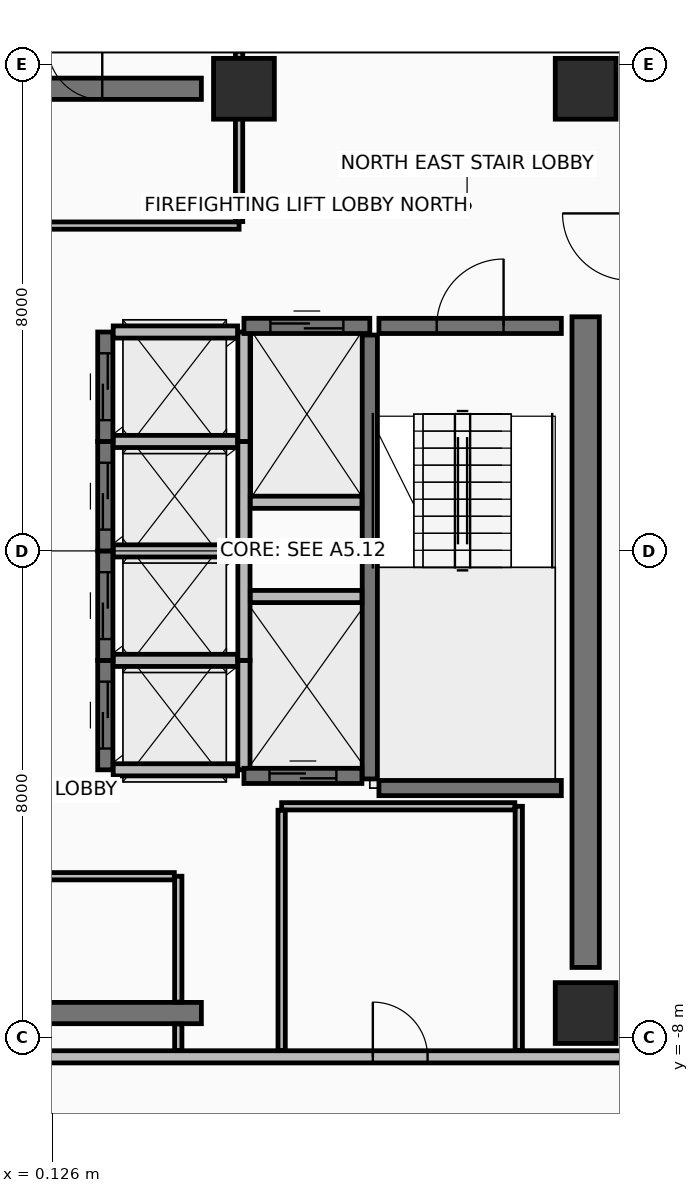
"""IFC4 building model, lengths in metres.
Left out: names, types, materials, properties, quantities, classifications, styles, units other than length and angle.
Written with IfcOpenShell. Run it as: python <this file> out.ifc"""

import sys

from ifc_helpers import new_model, si_unit, direction, frame, frame_2d, origin, origin_2d, place, context, subcontext, project, spatial, rectangle, extrude, element, fill, save


model = new_model("IFC4")
c1 = context("Model", 3, precision=1e-05, world=origin(), true_north=direction((0.0, 1.0)))
c2 = subcontext(c1, "Body", "Model", "MODEL_VIEW")
j1 = project(units=[si_unit("LENGTHUNIT", "METRE"), si_unit("PLANEANGLEUNIT", "RADIAN")], contexts=[c1])
p1 = place(None, origin())
s1 = spatial("IfcSite", under=j1, at=p1, CompositionType="ELEMENT")
p2 = place(p1, origin())
s2 = spatial("IfcBuilding", under=s1, at=p2, CompositionType="ELEMENT")
p3 = place(p2, frame((0.0, 0.0, 230.65)))
s3 = spatial("IfcBuildingStorey", under=s2, at=p3, CompositionType="ELEMENT", Elevation=230.65)
for number, where, z_axis, x_axis in (
    (1, (8.9, -7.6, 0.0), (0.0, 0.0, 1.0), (1.0, 0.0, 0.0)),
    (2, (8.9, 7.6, 0.0), (0.0, 0.0, 1.0), (1.0, 0.0, 0.0)),
    (3, (3.28, 7.6, 0.0), (0.0, 0.0, 1.0), (1.0, 0.0, 0.0)),
):
    element("IfcColumn", number, at=place(p3, frame(where, z_axis=z_axis, x_axis=x_axis)), inside=s3, PredefinedType="COLUMN", context=c2, shape_type="SweptSolid", body=[
        extrude(rectangle(XDim=1.0, YDim=1.0, at=origin_2d()), origin(), (0.0, 0.0, 1.0), 3.6),
    ])
for number, where, z_axis, x_axis in (
    (4, (-2.8, -7.6, 0.0), (0.0, 0.0, 1.0), (1.0, 0.0, 0.0)),
    (5, (-2.8, 7.6, 0.0), (0.0, 0.0, 1.0), (1.0, 0.0, 0.0)),
):
    element("IfcWall", number, at=place(p3, frame(where, z_axis=z_axis, x_axis=x_axis)), inside=s3, PredefinedType="SHEAR", context=c2, shape_type="SweptSolid", body=[
        extrude(rectangle(XDim=5.38, YDim=0.35, at=frame_2d((2.69, 0.0))), origin(), (0.0, 0.0, 1.0), 3.42),
    ])
p4 = place(p3, frame((8.9, -6.85, 0.0), z_axis=(0.0, 0.0, 1.0), x_axis=(0.0, 1.0, 0.0)))
e6 = element("IfcWall", 6, at=p4, inside=s3, PredefinedType="SHEAR", context=c2, shape_type="SweptSolid", body=[
    extrude(rectangle(XDim=10.7, YDim=0.45, at=frame_2d((5.35, 0.0))), origin(), (0.0, 0.0, 1.0), 3.42),
])
p5 = place(p3, frame((-9.62, -8.32, 0.0), z_axis=(0.0, 0.0, 1.0), x_axis=(1.0, 0.0, 0.0)))
e7 = element("IfcWall", 7, at=p5, inside=s3, PredefinedType="PARTITIONING", context=c2, shape_type="SweptSolid", body=[
    extrude(rectangle(XDim=19.24, YDim=0.2, at=frame_2d((9.62, 0.0))), origin(), (0.0, 0.0, 1.0), 2.915),
])
p6 = place(p5, frame((8.57, 0.0, 0.0)))
e8 = element("IfcOpeningElement", 8, at=p6, cuts=e7, PredefinedType="OPENING", context=c2, shape_type="SweptSolid", body=[
    extrude(rectangle(XDim=0.9, YDim=2.1, at=frame_2d((0.45, 1.05))), frame((0.0, 0.11, 0.0), z_axis=(0.0, -1.0, 0.0), x_axis=(1.0, 0.0, 0.0)), (0.0, 0.0, 1.0), 0.22),
])
p7 = place(p5, frame((15.02, 0.0, 0.0)))
e9 = element("IfcOpeningElement", 9, at=p7, cuts=e7, PredefinedType="OPENING", context=c2, shape_type="SweptSolid", body=[
    extrude(rectangle(XDim=0.9, YDim=2.1, at=frame_2d((0.45, 1.05))), frame((0.0, 0.11, 0.0), z_axis=(0.0, -1.0, 0.0), x_axis=(1.0, 0.0, 0.0)), (0.0, 0.0, 1.0), 0.22),
])
p8 = place(p3, frame((5.35, -3.75, 0.0), z_axis=(0.0, 0.0, 1.0), x_axis=(0.0, 1.0, 0.0)))
e10 = element("IfcWall", 10, at=p8, inside=s3, PredefinedType="SHEAR", context=c2, shape_type="SweptSolid", body=[
    extrude(rectangle(XDim=7.3, YDim=0.25, at=frame_2d((3.65, 0.0))), origin(), (0.0, 0.0, 1.0), 3.42),
])
p9 = place(p3, frame((5.5, 3.7, 0.0), z_axis=(0.0, 0.0, 1.0), x_axis=(1.0, 0.0, 0.0)))
e11 = element("IfcWall", 11, at=p9, inside=s3, PredefinedType="SHEAR", context=c2, shape_type="SweptSolid", body=[
    extrude(rectangle(XDim=3.0, YDim=0.25, at=frame_2d((1.5, 0.0))), origin(), (0.0, 0.0, 1.0), 3.42),
])
p10 = place(p9, frame((0.95, 0.0, 0.0)))
e12 = element("IfcOpeningElement", 12, at=p10, cuts=e11, PredefinedType="OPENING", context=c2, shape_type="SweptSolid", body=[
    extrude(rectangle(XDim=1.1, YDim=2.15, at=frame_2d((0.55, 1.075))), frame((0.0, 0.135, 0.0), z_axis=(0.0, -1.0, 0.0), x_axis=(1.0, 0.0, 0.0)), (0.0, 0.0, 1.0), 0.27),
])
p11 = place(p3, frame((5.5, -3.9, 0.0), z_axis=(0.0, 0.0, 1.0), x_axis=(1.0, 0.0, 0.0)))
e13 = element("IfcWall", 13, at=p11, inside=s3, PredefinedType="SHEAR", context=c2, shape_type="SweptSolid", body=[
    extrude(rectangle(XDim=3.0, YDim=0.25, at=frame_2d((1.5, 0.0))), origin(), (0.0, 0.0, 1.0), 3.42),
])
p12 = place(p3, frame((1.0, -3.6, 0.0), z_axis=(0.0, 0.0, 1.0), x_axis=(0.0, 1.0, 0.0)))
e14 = element("IfcWall", 14, at=p12, inside=s3, PredefinedType="SHEAR", context=c2, shape_type="SweptSolid", body=[
    extrude(rectangle(XDim=1.8, YDim=0.25, at=frame_2d((0.9, 0.0))), origin(), (0.0, 0.0, 1.0), 3.42),
])
p13 = place(p12, frame((0.35, 0.0, 0.0)))
e15 = element("IfcOpeningElement", 15, at=p13, cuts=e14, PredefinedType="OPENING", context=c2, shape_type="SweptSolid", body=[
    extrude(rectangle(XDim=1.1, YDim=2.2, at=frame_2d((0.55, 1.1))), frame((0.0, 0.135, 0.0), z_axis=(0.0, -1.0, 0.0), x_axis=(1.0, 0.0, 0.0)), (0.0, 0.0, 1.0), 0.27),
])
p14 = place(p3, frame((3.28, -3.6, 0.0), z_axis=(0.0, 0.0, 1.0), x_axis=(0.0, 1.0, 0.0)))
e16 = element("IfcWall", 16, at=p14, inside=s3, PredefinedType="PARTITIONING", context=c2, shape_type="SweptSolid", body=[
    extrude(rectangle(XDim=1.8, YDim=0.2, at=frame_2d((0.9, 0.0))), origin(), (0.0, 0.0, 1.0), 3.42),
])
for number, where, z_axis, x_axis in (
    (17, (1.13, -3.6, 0.0), (0.0, 0.0, 1.0), (1.0, 0.0, 0.0)),
    (18, (1.13, -1.8, 0.0), (0.0, 0.0, 1.0), (1.0, 0.0, 0.0)),
):
    element("IfcWall", number, at=place(p3, frame(where, z_axis=z_axis, x_axis=x_axis)), inside=s3, PredefinedType="PARTITIONING", context=c2, shape_type="SweptSolid", body=[
        extrude(rectangle(XDim=2.045, YDim=0.2, at=frame_2d((1.022, 0.0))), origin(), (0.0, 0.0, 1.0), 3.42),
    ])
p15 = place(p3, frame((1.0, -1.8, 0.0), z_axis=(0.0, 0.0, 1.0), x_axis=(0.0, 1.0, 0.0)))
e19 = element("IfcWall", 19, at=p15, inside=s3, PredefinedType="SHEAR", context=c2, shape_type="SweptSolid", body=[
    extrude(rectangle(XDim=1.8, YDim=0.25, at=frame_2d((0.9, 0.0))), origin(), (0.0, 0.0, 1.0), 3.42),
])
p16 = place(p15, frame((0.35, 0.0, 0.0)))
e20 = element("IfcOpeningElement", 20, at=p16, cuts=e19, PredefinedType="OPENING", context=c2, shape_type="SweptSolid", body=[
    extrude(rectangle(XDim=1.1, YDim=2.2, at=frame_2d((0.55, 1.1))), frame((0.0, 0.135, 0.0), z_axis=(0.0, -1.0, 0.0), x_axis=(1.0, 0.0, 0.0)), (0.0, 0.0, 1.0), 0.27),
])
p17 = place(p3, frame((3.28, -1.8, 0.0), z_axis=(0.0, 0.0, 1.0), x_axis=(0.0, 1.0, 0.0)))
e21 = element("IfcWall", 21, at=p17, inside=s3, PredefinedType="PARTITIONING", context=c2, shape_type="SweptSolid", body=[
    extrude(rectangle(XDim=1.8, YDim=0.2, at=frame_2d((0.9, 0.0))), origin(), (0.0, 0.0, 1.0), 3.42),
])
p18 = place(p3, frame((1.13, 0.0, 0.0), z_axis=(0.0, 0.0, 1.0), x_axis=(1.0, 0.0, 0.0)))
e22 = element("IfcWall", 22, at=p18, inside=s3, PredefinedType="PARTITIONING", context=c2, shape_type="SweptSolid", body=[
    extrude(rectangle(XDim=2.045, YDim=0.2, at=frame_2d((1.022, 0.0))), origin(), (0.0, 0.0, 1.0), 3.42),
])
p19 = place(p3, frame((1.0, 0.0, 0.0), z_axis=(0.0, 0.0, 1.0), x_axis=(0.0, 1.0, 0.0)))
e23 = element("IfcWall", 23, at=p19, inside=s3, PredefinedType="SHEAR", context=c2, shape_type="SweptSolid", body=[
    extrude(rectangle(XDim=1.8, YDim=0.25, at=frame_2d((0.9, 0.0))), origin(), (0.0, 0.0, 1.0), 3.42),
])
p20 = place(p19, frame((0.35, 0.0, 0.0)))
e24 = element("IfcOpeningElement", 24, at=p20, cuts=e23, PredefinedType="OPENING", context=c2, shape_type="SweptSolid", body=[
    extrude(rectangle(XDim=1.1, YDim=2.2, at=frame_2d((0.55, 1.1))), frame((0.0, 0.135, 0.0), z_axis=(0.0, -1.0, 0.0), x_axis=(1.0, 0.0, 0.0)), (0.0, 0.0, 1.0), 0.27),
])
p21 = place(p3, frame((3.28, 0.0, 0.0), z_axis=(0.0, 0.0, 1.0), x_axis=(0.0, 1.0, 0.0)))
e25 = element("IfcWall", 25, at=p21, inside=s3, PredefinedType="PARTITIONING", context=c2, shape_type="SweptSolid", body=[
    extrude(rectangle(XDim=1.8, YDim=0.2, at=frame_2d((0.9, 0.0))), origin(), (0.0, 0.0, 1.0), 3.42),
])
p22 = place(p3, frame((1.13, 1.8, 0.0), z_axis=(0.0, 0.0, 1.0), x_axis=(1.0, 0.0, 0.0)))
e26 = element("IfcWall", 26, at=p22, inside=s3, PredefinedType="PARTITIONING", context=c2, shape_type="SweptSolid", body=[
    extrude(rectangle(XDim=2.045, YDim=0.2, at=frame_2d((1.022, 0.0))), origin(), (0.0, 0.0, 1.0), 3.42),
])
p23 = place(p3, frame((1.0, 1.8, 0.0), z_axis=(0.0, 0.0, 1.0), x_axis=(0.0, 1.0, 0.0)))
e27 = element("IfcWall", 27, at=p23, inside=s3, PredefinedType="SHEAR", context=c2, shape_type="SweptSolid", body=[
    extrude(rectangle(XDim=1.8, YDim=0.25, at=frame_2d((0.9, 0.0))), origin(), (0.0, 0.0, 1.0), 3.42),
])
p24 = place(p23, frame((0.35, 0.0, 0.0)))
e28 = element("IfcOpeningElement", 28, at=p24, cuts=e27, PredefinedType="OPENING", context=c2, shape_type="SweptSolid", body=[
    extrude(rectangle(XDim=1.1, YDim=2.2, at=frame_2d((0.55, 1.1))), frame((0.0, 0.135, 0.0), z_axis=(0.0, -1.0, 0.0), x_axis=(1.0, 0.0, 0.0)), (0.0, 0.0, 1.0), 0.27),
])
p25 = place(p3, frame((3.28, 1.8, 0.0), z_axis=(0.0, 0.0, 1.0), x_axis=(0.0, 1.0, 0.0)))
e29 = element("IfcWall", 29, at=p25, inside=s3, PredefinedType="PARTITIONING", context=c2, shape_type="SweptSolid", body=[
    extrude(rectangle(XDim=1.8, YDim=0.2, at=frame_2d((0.9, 0.0))), origin(), (0.0, 0.0, 1.0), 3.42),
])
p26 = place(p3, frame((1.13, 3.6, 0.0), z_axis=(0.0, 0.0, 1.0), x_axis=(1.0, 0.0, 0.0)))
e30 = element("IfcWall", 30, at=p26, inside=s3, PredefinedType="PARTITIONING", context=c2, shape_type="SweptSolid", body=[
    extrude(rectangle(XDim=2.045, YDim=0.2, at=frame_2d((1.022, 0.0))), origin(), (0.0, 0.0, 1.0), 2.715),
])
p27 = place(p3, frame((3.28, 3.7, 0.0), z_axis=(0.0, 0.0, 1.0), x_axis=(1.0, 0.0, 0.0)))
e31 = element("IfcWall", 31, at=p27, inside=s3, PredefinedType="SHEAR", context=c2, shape_type="SweptSolid", body=[
    extrude(rectangle(XDim=2.07, YDim=0.25, at=frame_2d((1.035, 0.0))), origin(), (0.0, 0.0, 1.0), 3.42),
])
p28 = place(p27, frame((0.435, 0.0, 0.0)))
e32 = element("IfcOpeningElement", 32, at=p28, cuts=e31, PredefinedType="OPENING", context=c2, shape_type="SweptSolid", body=[
    extrude(rectangle(XDim=1.2, YDim=2.2, at=frame_2d((0.6, 1.1))), frame((0.0, 0.135, 0.0), z_axis=(0.0, -1.0, 0.0), x_axis=(1.0, 0.0, 0.0)), (0.0, 0.0, 1.0), 0.27),
])
p29 = place(p3, frame((3.385, 0.8, 0.0), z_axis=(0.0, 0.0, 1.0), x_axis=(1.0, 0.0, 0.0)))
e33 = element("IfcWall", 33, at=p29, inside=s3, PredefinedType="PARTITIONING", context=c2, shape_type="SweptSolid", body=[
    extrude(rectangle(XDim=1.835, YDim=0.2, at=frame_2d((0.917, 0.0))), origin(), (0.0, 0.0, 1.0), 3.42),
])
p30 = place(p3, frame((3.28, -3.7, 0.0), z_axis=(0.0, 0.0, 1.0), x_axis=(1.0, 0.0, 0.0)))
e34 = element("IfcWall", 34, at=p30, inside=s3, PredefinedType="SHEAR", context=c2, shape_type="SweptSolid", body=[
    extrude(rectangle(XDim=1.94, YDim=0.25, at=frame_2d((0.97, 0.0))), origin(), (0.0, 0.0, 1.0), 3.42),
])
p31 = place(p30, frame((0.42, 0.0, 0.0)))
e35 = element("IfcOpeningElement", 35, at=p31, cuts=e34, PredefinedType="OPENING", context=c2, shape_type="SweptSolid", body=[
    extrude(rectangle(XDim=1.1, YDim=2.2, at=frame_2d((0.55, 1.1))), frame((0.0, 0.135, 0.0), z_axis=(0.0, -1.0, 0.0), x_axis=(1.0, 0.0, 0.0)), (0.0, 0.0, 1.0), 0.27),
])
p32 = place(p3, frame((3.385, -0.75, 0.0), z_axis=(0.0, 0.0, 1.0), x_axis=(1.0, 0.0, 0.0)))
e36 = element("IfcWall", 36, at=p32, inside=s3, PredefinedType="PARTITIONING", context=c2, shape_type="SweptSolid", body=[
    extrude(rectangle(XDim=1.835, YDim=0.2, at=frame_2d((0.917, 0.0))), origin(), (0.0, 0.0, 1.0), 3.42),
])
p33 = place(p3, frame((2.2, -8.215, 0.0), z_axis=(0.0, 0.0, 1.0), x_axis=(0.0, 1.0, 0.0)))
e37 = element("IfcWall", 37, at=p33, inside=s3, PredefinedType="PARTITIONING", context=c2, shape_type="SweptSolid", body=[
    extrude(rectangle(XDim=0.435, YDim=0.12, at=frame_2d((0.218, 0.0))), origin(), (0.0, 0.0, 1.0), 2.715),
])
p34 = place(p3, frame((2.2, -7.42, 0.0), z_axis=(0.0, 0.0, 1.0), x_axis=(0.0, 1.0, 0.0)))
e38 = element("IfcWall", 38, at=p34, inside=s3, PredefinedType="PARTITIONING", context=c2, shape_type="SweptSolid", body=[
    extrude(rectangle(XDim=2.07, YDim=0.12, at=frame_2d((1.035, 0.0))), origin(), (0.0, 0.0, 1.0), 2.715),
])
p35 = place(p3, frame((2.135, -5.35, 0.0), z_axis=(0.0, 0.0, 1.0), x_axis=(-1.0, 0.0, 0.0)))
e39 = element("IfcWall", 39, at=p35, inside=s3, PredefinedType="PARTITIONING", context=c2, shape_type="SweptSolid", body=[
    extrude(rectangle(XDim=5.535, YDim=0.12, at=frame_2d((2.768, 0.0))), origin(), (0.0, 0.0, 1.0), 2.715),
])
p36 = place(p3, frame((-2.2, 5.35, 0.0), z_axis=(0.0, 0.0, 1.0), x_axis=(1.0, 0.0, 0.0)))
e40 = element("IfcWall", 40, at=p36, inside=s3, PredefinedType="PARTITIONING", context=c2, shape_type="SweptSolid", body=[
    extrude(rectangle(XDim=5.4, YDim=0.12, at=frame_2d((2.7, 0.0))), origin(), (0.0, 0.0, 1.0), 2.715),
])
p37 = place(p3, frame((3.2, 5.415, 0.0), z_axis=(0.0, 0.0, 1.0), x_axis=(0.0, 1.0, 0.0)))
e41 = element("IfcWall", 41, at=p37, inside=s3, PredefinedType="PARTITIONING", context=c2, shape_type="SweptSolid", body=[
    extrude(rectangle(XDim=2.8, YDim=0.12, at=frame_2d((1.4, 0.0))), origin(), (0.0, 0.0, 1.0), 2.715),
])
p38 = place(p3, frame((7.8, -8.215, 0.0), z_axis=(0.0, 0.0, 1.0), x_axis=(0.0, 1.0, 0.0)))
e42 = element("IfcWall", 42, at=p38, inside=s3, PredefinedType="PARTITIONING", context=c2, shape_type="SweptSolid", body=[
    extrude(rectangle(XDim=4.015, YDim=0.12, at=frame_2d((2.008, 0.0))), origin(), (0.0, 0.0, 1.0), 2.715),
])
p39 = place(p3, frame((7.735, -4.2, 0.0), z_axis=(0.0, 0.0, 1.0), x_axis=(-1.0, 0.0, 0.0)))
e43 = element("IfcWall", 43, at=p39, inside=s3, PredefinedType="PARTITIONING", context=c2, shape_type="SweptSolid", body=[
    extrude(rectangle(XDim=3.835, YDim=0.12, at=frame_2d((1.917, 0.0))), origin(), (0.0, 0.0, 1.0), 3.42),
])
p40 = place(p3, frame((3.9, -4.265, 0.0), z_axis=(0.0, 0.0, 1.0), x_axis=(0.0, -1.0, 0.0)))
e44 = element("IfcWall", 44, at=p40, inside=s3, PredefinedType="PARTITIONING", context=c2, shape_type="SweptSolid", body=[
    extrude(rectangle(XDim=3.95, YDim=0.12, at=frame_2d((1.975, 0.0))), origin(), (0.0, 0.0, 1.0), 2.715),
])
p41 = place(p3, frame((23.246, -0.917, 0.0), z_axis=(0.0, 0.0, 1.0), x_axis=(-0.559194966555, -0.829036180984, 0.0)))
e45 = element("IfcWall", 45, at=p41, inside=s3, PredefinedType="PARTITIONING", context=c2, shape_type="SweptSolid", body=[
    extrude(rectangle(XDim=28.702, YDim=0.15, at=frame_2d((14.351, 0.0))), origin(), (0.0, 0.0, 1.0), 3.42),
])
p42 = place(p10, frame((1.1, 0.0, 0.0), z_axis=(0.0, 0.0, 1.0), x_axis=(-1.0, 0.0, 0.0)))
e46 = element("IfcDoor", 46, at=p42, inside=s3, OperationType="SINGLE_SWING_LEFT", PredefinedType="DOOR", context=c2, shape_type="SweptSolid", body=[
    extrude(rectangle(XDim=1.1, YDim=2.15, at=frame_2d((0.55, 1.075))), frame((0.0, 0.025, 0.0), z_axis=(0.0, -1.0, 0.0), x_axis=(1.0, 0.0, 0.0)), (0.0, 0.0, 1.0), 0.05),
])
fill(e12, e46)
p43 = place(p13, origin())
e47 = element("IfcDoor", 47, at=p43, inside=s3, OperationType="SLIDING_TO_LEFT", PredefinedType="DOOR", context=c2, shape_type="SweptSolid", body=[
    extrude(rectangle(XDim=1.1, YDim=2.2, at=frame_2d((0.55, 1.1))), frame((0.0, 0.025, 0.0), z_axis=(0.0, -1.0, 0.0), x_axis=(1.0, 0.0, 0.0)), (0.0, 0.0, 1.0), 0.05),
])
fill(e15, e47)
p44 = place(p16, origin())
e48 = element("IfcDoor", 48, at=p44, inside=s3, OperationType="SLIDING_TO_LEFT", PredefinedType="DOOR", context=c2, shape_type="SweptSolid", body=[
    extrude(rectangle(XDim=1.1, YDim=2.2, at=frame_2d((0.55, 1.1))), frame((0.0, 0.025, 0.0), z_axis=(0.0, -1.0, 0.0), x_axis=(1.0, 0.0, 0.0)), (0.0, 0.0, 1.0), 0.05),
])
fill(e20, e48)
p45 = place(p20, origin())
e49 = element("IfcDoor", 49, at=p45, inside=s3, OperationType="SLIDING_TO_LEFT", PredefinedType="DOOR", context=c2, shape_type="SweptSolid", body=[
    extrude(rectangle(XDim=1.1, YDim=2.2, at=frame_2d((0.55, 1.1))), frame((0.0, 0.025, 0.0), z_axis=(0.0, -1.0, 0.0), x_axis=(1.0, 0.0, 0.0)), (0.0, 0.0, 1.0), 0.05),
])
fill(e24, e49)
p46 = place(p24, origin())
e50 = element("IfcDoor", 50, at=p46, inside=s3, OperationType="SLIDING_TO_LEFT", PredefinedType="DOOR", context=c2, shape_type="SweptSolid", body=[
    extrude(rectangle(XDim=1.1, YDim=2.2, at=frame_2d((0.55, 1.1))), frame((0.0, 0.025, 0.0), z_axis=(0.0, -1.0, 0.0), x_axis=(1.0, 0.0, 0.0)), (0.0, 0.0, 1.0), 0.05),
])
fill(e28, e50)
p47 = place(p28, origin())
e51 = element("IfcDoor", 51, at=p47, inside=s3, OperationType="SLIDING_TO_RIGHT", PredefinedType="DOOR", context=c2, shape_type="SweptSolid", body=[
    extrude(rectangle(XDim=1.2, YDim=2.2, at=frame_2d((0.6, 1.1))), frame((0.0, 0.025, 0.0), z_axis=(0.0, -1.0, 0.0), x_axis=(1.0, 0.0, 0.0)), (0.0, 0.0, 1.0), 0.05),
])
fill(e32, e51)
p48 = place(p31, origin())
e52 = element("IfcDoor", 52, at=p48, inside=s3, OperationType="SLIDING_TO_LEFT", PredefinedType="DOOR", context=c2, shape_type="SweptSolid", body=[
    extrude(rectangle(XDim=1.1, YDim=2.2, at=frame_2d((0.55, 1.1))), frame((0.0, 0.025, 0.0), z_axis=(0.0, -1.0, 0.0), x_axis=(1.0, 0.0, 0.0)), (0.0, 0.0, 1.0), 0.05),
])
fill(e35, e52)
p49 = place(p7, origin())
e53 = element("IfcDoor", 53, at=p49, inside=s3, OperationType="SINGLE_SWING_LEFT", PredefinedType="DOOR", context=c2, shape_type="SweptSolid", body=[
    extrude(rectangle(XDim=0.9, YDim=2.1, at=frame_2d((0.45, 1.05))), frame((0.0, 0.025, 0.0), z_axis=(0.0, -1.0, 0.0), x_axis=(1.0, 0.0, 0.0)), (0.0, 0.0, 1.0), 0.05),
])
fill(e9, e53)
save(model, sys.argv[1])
